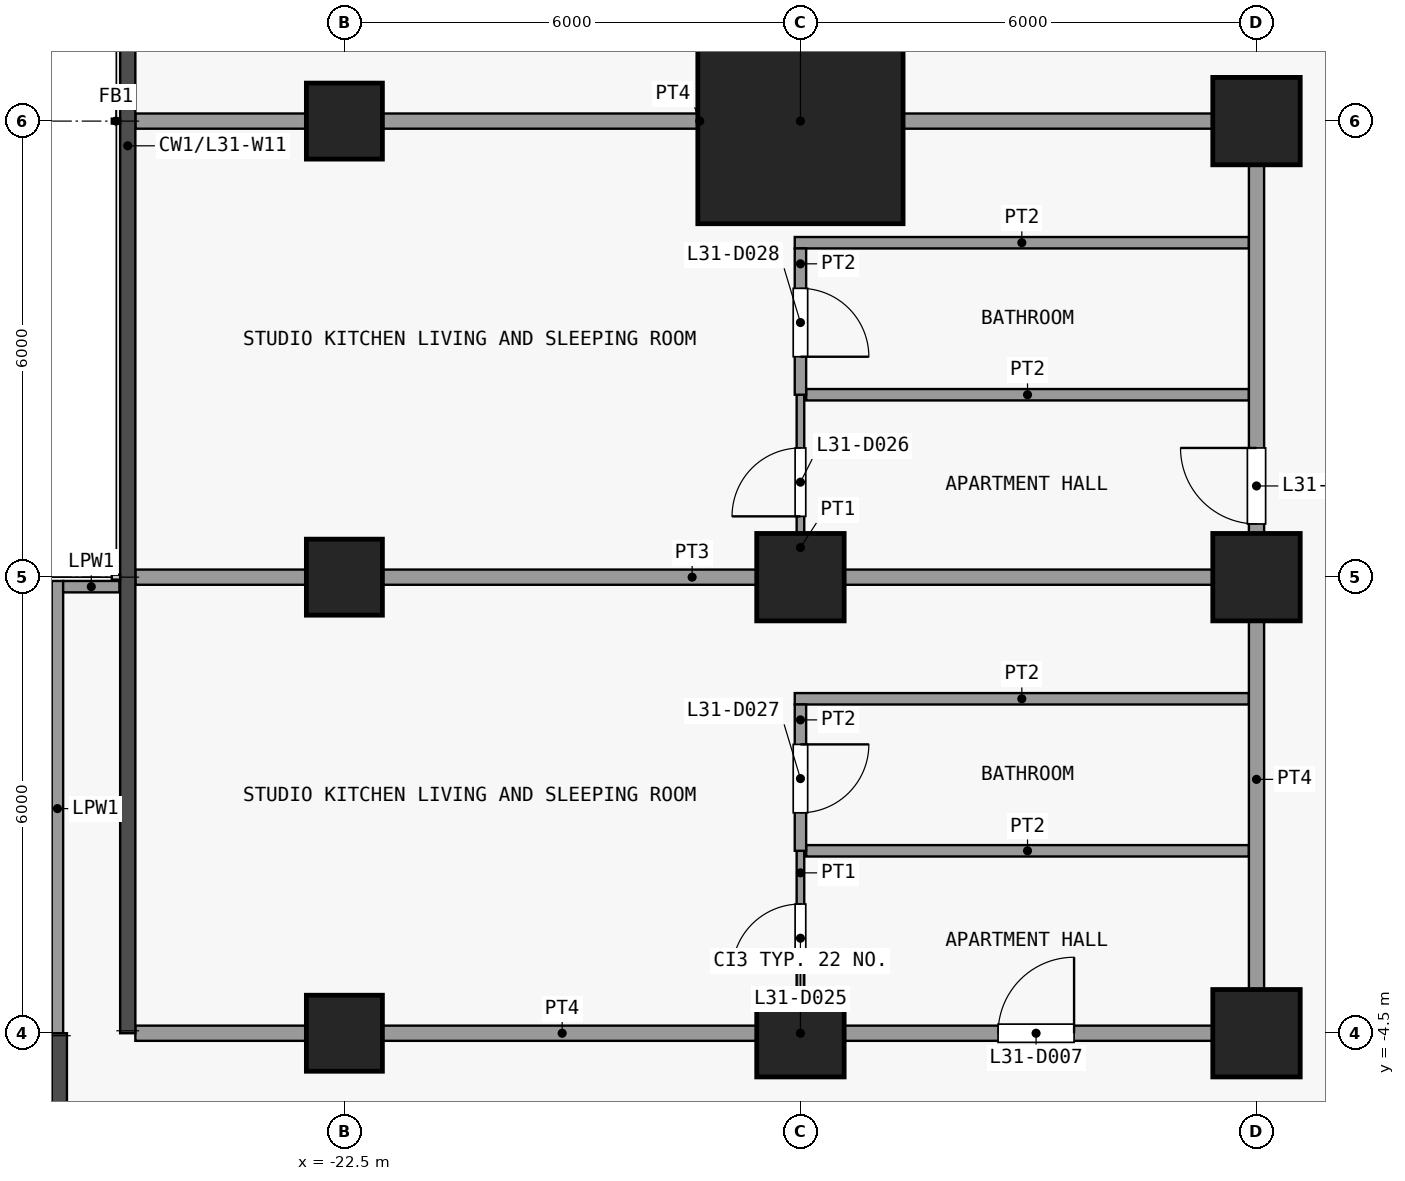
"""IFC4 building model, lengths in metres.
Left out: names, types, materials, properties, quantities, classifications, styles, units other than length and angle.
Written with IfcOpenShell. Run it as: python <this file> out.ifc"""

import sys

from ifc_helpers import new_model, si_unit, direction, frame, frame_2d, origin, origin_2d, place, context, subcontext, project, spatial, rectangle, extrude, element, fill, save


model = new_model("IFC4")
c1 = context("Model", 3, precision=1e-05, world=origin(), true_north=direction((0.0, 1.0)))
c2 = subcontext(c1, "Body", "Model", "MODEL_VIEW")
j1 = project(units=[si_unit("LENGTHUNIT", "METRE"), si_unit("PLANEANGLEUNIT", "RADIAN")], contexts=[c1])
p1 = place(None, origin())
s1 = spatial("IfcSite", under=j1, at=p1, CompositionType="ELEMENT")
p2 = place(p1, origin())
s2 = spatial("IfcBuilding", under=s1, at=p2, CompositionType="ELEMENT")
p3 = place(p2, frame((0.0, 0.0, 124.3)))
s3 = spatial("IfcBuildingStorey", under=s2, at=p3, CompositionType="ELEMENT", Elevation=124.3)
for number, where, z_axis, x_axis in (
    (1, (-22.5, -4.5, 0.0), (0.0, 0.0, 1.0), (1.0, 0.0, 0.0)),
    (2, (-22.5, 1.5, 0.0), (0.0, 0.0, 1.0), (1.0, 0.0, 0.0)),
    (3, (-22.5, 7.5, 0.0), (0.0, 0.0, 1.0), (1.0, 0.0, 0.0)),
):
    element("IfcColumn", number, at=place(p3, frame(where, z_axis=z_axis, x_axis=x_axis)), inside=s3, PredefinedType="COLUMN", context=c2, shape_type="SweptSolid", body=[
        extrude(rectangle(XDim=1.0, YDim=1.0, at=origin_2d()), origin(), (0.0, 0.0, 1.0), 3.6),
    ])
for number, where, z_axis, x_axis in (
    (4, (-16.5, -4.5, 0.0), (0.0, 0.0, 1.0), (1.0, 0.0, 0.0)),
    (5, (-16.5, 1.5, 0.0), (0.0, 0.0, 1.0), (1.0, 0.0, 0.0)),
):
    element("IfcColumn", number, at=place(p3, frame(where, z_axis=z_axis, x_axis=x_axis)), inside=s3, PredefinedType="COLUMN", context=c2, shape_type="SweptSolid", body=[
        extrude(rectangle(XDim=1.15, YDim=1.15, at=origin_2d()), origin(), (0.0, 0.0, 1.0), 3.6),
    ])
p4 = place(p3, frame((-16.5, 7.5, 0.0), z_axis=(0.0, 0.0, 1.0), x_axis=(1.0, 0.0, 0.0)))
e6 = element("IfcColumn", 6, at=p4, inside=s3, PredefinedType="COLUMN", context=c2, shape_type="SweptSolid", body=[
    extrude(rectangle(XDim=2.7, YDim=2.7, at=origin_2d()), origin(), (0.0, 0.0, 1.0), 3.6),
])
for number, where, z_axis, x_axis in (
    (7, (-10.5, -4.5, 0.0), (0.0, 0.0, 1.0), (1.0, 0.0, 0.0)),
    (8, (-10.5, 1.5, 0.0), (0.0, 0.0, 1.0), (1.0, 0.0, 0.0)),
    (9, (-10.5, 7.5, 0.0), (0.0, 0.0, 1.0), (1.0, 0.0, 0.0)),
):
    element("IfcColumn", number, at=place(p3, frame(where, z_axis=z_axis, x_axis=x_axis)), inside=s3, PredefinedType="COLUMN", context=c2, shape_type="SweptSolid", body=[
        extrude(rectangle(XDim=1.15, YDim=1.15, at=origin_2d()), origin(), (0.0, 0.0, 1.0), 3.6),
    ])
p5 = place(p3, frame((-26.275, -4.54, 0.0), z_axis=(0.0, 0.0, 1.0), x_axis=(0.0, 1.0, 0.0)))
e10 = element("IfcWall", 10, at=p5, inside=s3, PredefinedType="PARAPET", context=c2, shape_type="SweptSolid", body=[
    extrude(rectangle(XDim=5.99, YDim=0.15, at=frame_2d((2.995, 0.0))), origin(), (0.0, 0.0, 1.0), 1.15),
])
p6 = place(p3, frame((-26.2, 1.375, 0.0), z_axis=(0.0, 0.0, 1.0), x_axis=(1.0, 0.0, 0.0)))
e11 = element("IfcWall", 11, at=p6, inside=s3, PredefinedType="PARAPET", context=c2, shape_type="SweptSolid", body=[
    extrude(rectangle(XDim=0.74, YDim=0.15, at=frame_2d((0.37, 0.0))), origin(), (0.0, 0.0, 1.0), 1.15),
])
p7 = place(p3, frame((-25.25, -4.5, 0.0), z_axis=(0.0, 0.0, 1.0), x_axis=(1.0, 0.0, 0.0)))
e12 = element("IfcWall", 12, at=p7, inside=s3, PredefinedType="PARTITIONING", context=c2, shape_type="SweptSolid", body=[
    extrude(rectangle(XDim=14.85, YDim=0.2, at=frame_2d((7.425, 0.0))), origin(), (0.0, 0.0, 1.0), 3.3),
])
p8 = place(p7, frame((11.35, 0.0, 0.0)))
e13 = element("IfcOpeningElement", 13, at=p8, cuts=e12, PredefinedType="OPENING", context=c2, shape_type="SweptSolid", body=[
    extrude(rectangle(XDim=1.0, YDim=2.1, at=frame_2d((0.5, 1.05))), frame((0.0, 0.11, 0.0), z_axis=(0.0, -1.0, 0.0), x_axis=(1.0, 0.0, 0.0)), (0.0, 0.0, 1.0), 0.22),
])
p9 = place(p3, frame((-16.425, -2.1, 0.0), z_axis=(0.0, 0.0, 1.0), x_axis=(1.0, 0.0, 0.0)))
e14 = element("IfcWall", 14, at=p9, inside=s3, PredefinedType="PARTITIONING", context=c2, shape_type="SweptSolid", body=[
    extrude(rectangle(XDim=5.825, YDim=0.15, at=frame_2d((2.913, 0.0))), origin(), (0.0, 0.0, 1.0), 3.3),
])
p10 = place(p3, frame((-16.575, -0.1, 0.0), z_axis=(0.0, 0.0, 1.0), x_axis=(1.0, 0.0, 0.0)))
e15 = element("IfcWall", 15, at=p10, inside=s3, PredefinedType="PARTITIONING", context=c2, shape_type="SweptSolid", body=[
    extrude(rectangle(XDim=5.975, YDim=0.15, at=frame_2d((2.987, 0.0))), origin(), (0.0, 0.0, 1.0), 3.3),
])
p11 = place(p3, frame((-25.25, 1.5, 0.0), z_axis=(0.0, 0.0, 1.0), x_axis=(1.0, 0.0, 0.0)))
e16 = element("IfcWall", 16, at=p11, inside=s3, PredefinedType="PARTITIONING", context=c2, shape_type="SweptSolid", body=[
    extrude(rectangle(XDim=14.65, YDim=0.2, at=frame_2d((7.325, 0.0))), origin(), (0.0, 0.0, 1.0), 3.3),
])
p12 = place(p3, frame((-16.425, 3.9, 0.0), z_axis=(0.0, 0.0, 1.0), x_axis=(1.0, 0.0, 0.0)))
e17 = element("IfcWall", 17, at=p12, inside=s3, PredefinedType="PARTITIONING", context=c2, shape_type="SweptSolid", body=[
    extrude(rectangle(XDim=5.825, YDim=0.15, at=frame_2d((2.913, 0.0))), origin(), (0.0, 0.0, 1.0), 3.3),
])
p13 = place(p3, frame((-16.575, 5.9, 0.0), z_axis=(0.0, 0.0, 1.0), x_axis=(1.0, 0.0, 0.0)))
e18 = element("IfcWall", 18, at=p13, inside=s3, PredefinedType="PARTITIONING", context=c2, shape_type="SweptSolid", body=[
    extrude(rectangle(XDim=5.975, YDim=0.15, at=frame_2d((2.987, 0.0))), origin(), (0.0, 0.0, 1.0), 3.3),
])
p14 = place(p3, frame((-25.25, 7.5, 0.0), z_axis=(0.0, 0.0, 1.0), x_axis=(1.0, 0.0, 0.0)))
e19 = element("IfcWall", 19, at=p14, inside=s3, PredefinedType="PARTITIONING", context=c2, shape_type="SweptSolid", body=[
    extrude(rectangle(XDim=14.85, YDim=0.2, at=frame_2d((7.425, 0.0))), origin(), (0.0, 0.0, 1.0), 3.3),
])
p15 = place(p3, frame((-16.5, -4.4, 0.0), z_axis=(0.0, 0.0, 1.0), x_axis=(0.0, 1.0, 0.0)))
e20 = element("IfcWall", 20, at=p15, inside=s3, PredefinedType="PARTITIONING", context=c2, shape_type="SweptSolid", body=[
    extrude(rectangle(XDim=2.3, YDim=0.1, at=frame_2d((1.15, 0.0))), origin(), (0.0, 0.0, 1.0), 3.3),
])
p16 = place(p15, frame((0.7, 0.0, 0.0)))
e21 = element("IfcOpeningElement", 21, at=p16, cuts=e20, PredefinedType="OPENING", context=c2, shape_type="SweptSolid", body=[
    extrude(rectangle(XDim=0.9, YDim=2.1, at=frame_2d((0.45, 1.05))), frame((0.0, 0.06, 0.0), z_axis=(0.0, -1.0, 0.0), x_axis=(1.0, 0.0, 0.0)), (0.0, 0.0, 1.0), 0.12),
])
p17 = place(p3, frame((-16.5, 1.6, 0.0), z_axis=(0.0, 0.0, 1.0), x_axis=(0.0, 1.0, 0.0)))
e22 = element("IfcWall", 22, at=p17, inside=s3, PredefinedType="PARTITIONING", context=c2, shape_type="SweptSolid", body=[
    extrude(rectangle(XDim=2.3, YDim=0.1, at=frame_2d((1.15, 0.0))), origin(), (0.0, 0.0, 1.0), 3.3),
])
p18 = place(p17, frame((0.7, 0.0, 0.0)))
e23 = element("IfcOpeningElement", 23, at=p18, cuts=e22, PredefinedType="OPENING", context=c2, shape_type="SweptSolid", body=[
    extrude(rectangle(XDim=0.9, YDim=2.1, at=frame_2d((0.45, 1.05))), frame((0.0, 0.06, 0.0), z_axis=(0.0, -1.0, 0.0), x_axis=(1.0, 0.0, 0.0)), (0.0, 0.0, 1.0), 0.12),
])
p19 = place(p3, frame((-16.5, -2.1, 0.0), z_axis=(0.0, 0.0, 1.0), x_axis=(0.0, 1.0, 0.0)))
e24 = element("IfcWall", 24, at=p19, inside=s3, PredefinedType="PARTITIONING", context=c2, shape_type="SweptSolid", body=[
    extrude(rectangle(XDim=1.925, YDim=0.15, at=frame_2d((0.962, 0.0))), origin(), (0.0, 0.0, 1.0), 3.3),
])
p20 = place(p19, frame((0.5, 0.0, 0.0)))
e25 = element("IfcOpeningElement", 25, at=p20, cuts=e24, PredefinedType="OPENING", context=c2, shape_type="SweptSolid", body=[
    extrude(rectangle(XDim=0.9, YDim=2.1, at=frame_2d((0.45, 1.05))), frame((0.0, 0.085, 0.0), z_axis=(0.0, -1.0, 0.0), x_axis=(1.0, 0.0, 0.0)), (0.0, 0.0, 1.0), 0.17),
])
p21 = place(p3, frame((-16.5, 3.9, 0.0), z_axis=(0.0, 0.0, 1.0), x_axis=(0.0, 1.0, 0.0)))
e26 = element("IfcWall", 26, at=p21, inside=s3, PredefinedType="PARTITIONING", context=c2, shape_type="SweptSolid", body=[
    extrude(rectangle(XDim=1.925, YDim=0.15, at=frame_2d((0.962, 0.0))), origin(), (0.0, 0.0, 1.0), 3.3),
])
p22 = place(p21, frame((0.5, 0.0, 0.0)))
e27 = element("IfcOpeningElement", 27, at=p22, cuts=e26, PredefinedType="OPENING", context=c2, shape_type="SweptSolid", body=[
    extrude(rectangle(XDim=0.9, YDim=2.1, at=frame_2d((0.45, 1.05))), frame((0.0, 0.085, 0.0), z_axis=(0.0, -1.0, 0.0), x_axis=(1.0, 0.0, 0.0)), (0.0, 0.0, 1.0), 0.17),
])
p23 = place(p3, frame((-10.5, -4.4, 0.0), z_axis=(0.0, 0.0, 1.0), x_axis=(0.0, 1.0, 0.0)))
e28 = element("IfcWall", 28, at=p23, inside=s3, PredefinedType="PARTITIONING", context=c2, shape_type="SweptSolid", body=[
    extrude(rectangle(XDim=11.8, YDim=0.2, at=frame_2d((5.9, 0.0))), origin(), (0.0, 0.0, 1.0), 3.3),
])
p24 = place(p23, frame((6.6, 0.0, 0.0)))
e29 = element("IfcOpeningElement", 29, at=p24, cuts=e28, PredefinedType="OPENING", context=c2, shape_type="SweptSolid", body=[
    extrude(rectangle(XDim=1.0, YDim=2.1, at=frame_2d((0.5, 1.05))), frame((0.0, 0.11, 0.0), z_axis=(0.0, -1.0, 0.0), x_axis=(1.0, 0.0, 0.0)), (0.0, 0.0, 1.0), 0.22),
])
p25 = place(p8, origin())
e30 = element("IfcDoor", 30, at=p25, inside=s3, OperationType="SINGLE_SWING_LEFT", PredefinedType="DOOR", context=c2, shape_type="SweptSolid", body=[
    extrude(rectangle(XDim=1.0, YDim=2.1, at=frame_2d((0.5, 1.05))), frame((0.0, 0.025, 0.0), z_axis=(0.0, -1.0, 0.0), x_axis=(1.0, 0.0, 0.0)), (0.0, 0.0, 1.0), 0.05),
])
fill(e13, e30)
p26 = place(p16, origin())
e31 = element("IfcDoor", 31, at=p26, inside=s3, OperationType="SINGLE_SWING_RIGHT", PredefinedType="DOOR", context=c2, shape_type="SweptSolid", body=[
    extrude(rectangle(XDim=0.9, YDim=2.1, at=frame_2d((0.45, 1.05))), frame((0.0, 0.025, 0.0), z_axis=(0.0, -1.0, 0.0), x_axis=(1.0, 0.0, 0.0)), (0.0, 0.0, 1.0), 0.05),
])
fill(e21, e31)
p27 = place(p18, origin())
e32 = element("IfcDoor", 32, at=p27, inside=s3, OperationType="SINGLE_SWING_RIGHT", PredefinedType="DOOR", context=c2, shape_type="SweptSolid", body=[
    extrude(rectangle(XDim=0.9, YDim=2.1, at=frame_2d((0.45, 1.05))), frame((0.0, 0.025, 0.0), z_axis=(0.0, -1.0, 0.0), x_axis=(1.0, 0.0, 0.0)), (0.0, 0.0, 1.0), 0.05),
])
fill(e23, e32)
p28 = place(p20, origin())
e33 = element("IfcDoor", 33, at=p28, inside=s3, OperationType="SINGLE_SWING_RIGHT", PredefinedType="DOOR", context=c2, shape_type="SweptSolid", body=[
    extrude(rectangle(XDim=0.9, YDim=2.1, at=frame_2d((0.45, 1.05))), frame((0.0, 0.025, 0.0), z_axis=(0.0, -1.0, 0.0), x_axis=(1.0, 0.0, 0.0)), (0.0, 0.0, 1.0), 0.05),
])
fill(e25, e33)
p29 = place(p22, origin())
e34 = element("IfcDoor", 34, at=p29, inside=s3, OperationType="SINGLE_SWING_LEFT", PredefinedType="DOOR", context=c2, shape_type="SweptSolid", body=[
    extrude(rectangle(XDim=0.9, YDim=2.1, at=frame_2d((0.45, 1.05))), frame((0.0, 0.025, 0.0), z_axis=(0.0, -1.0, 0.0), x_axis=(1.0, 0.0, 0.0)), (0.0, 0.0, 1.0), 0.05),
])
fill(e27, e34)
p30 = place(p24, origin())
e35 = element("IfcDoor", 35, at=p30, inside=s3, OperationType="SINGLE_SWING_LEFT", PredefinedType="DOOR", context=c2, shape_type="SweptSolid", body=[
    extrude(rectangle(XDim=1.0, YDim=2.1, at=frame_2d((0.5, 1.05))), frame((0.0, 0.025, 0.0), z_axis=(0.0, -1.0, 0.0), x_axis=(1.0, 0.0, 0.0)), (0.0, 0.0, 1.0), 0.05),
])
fill(e29, e35)
save(model, sys.argv[1])
